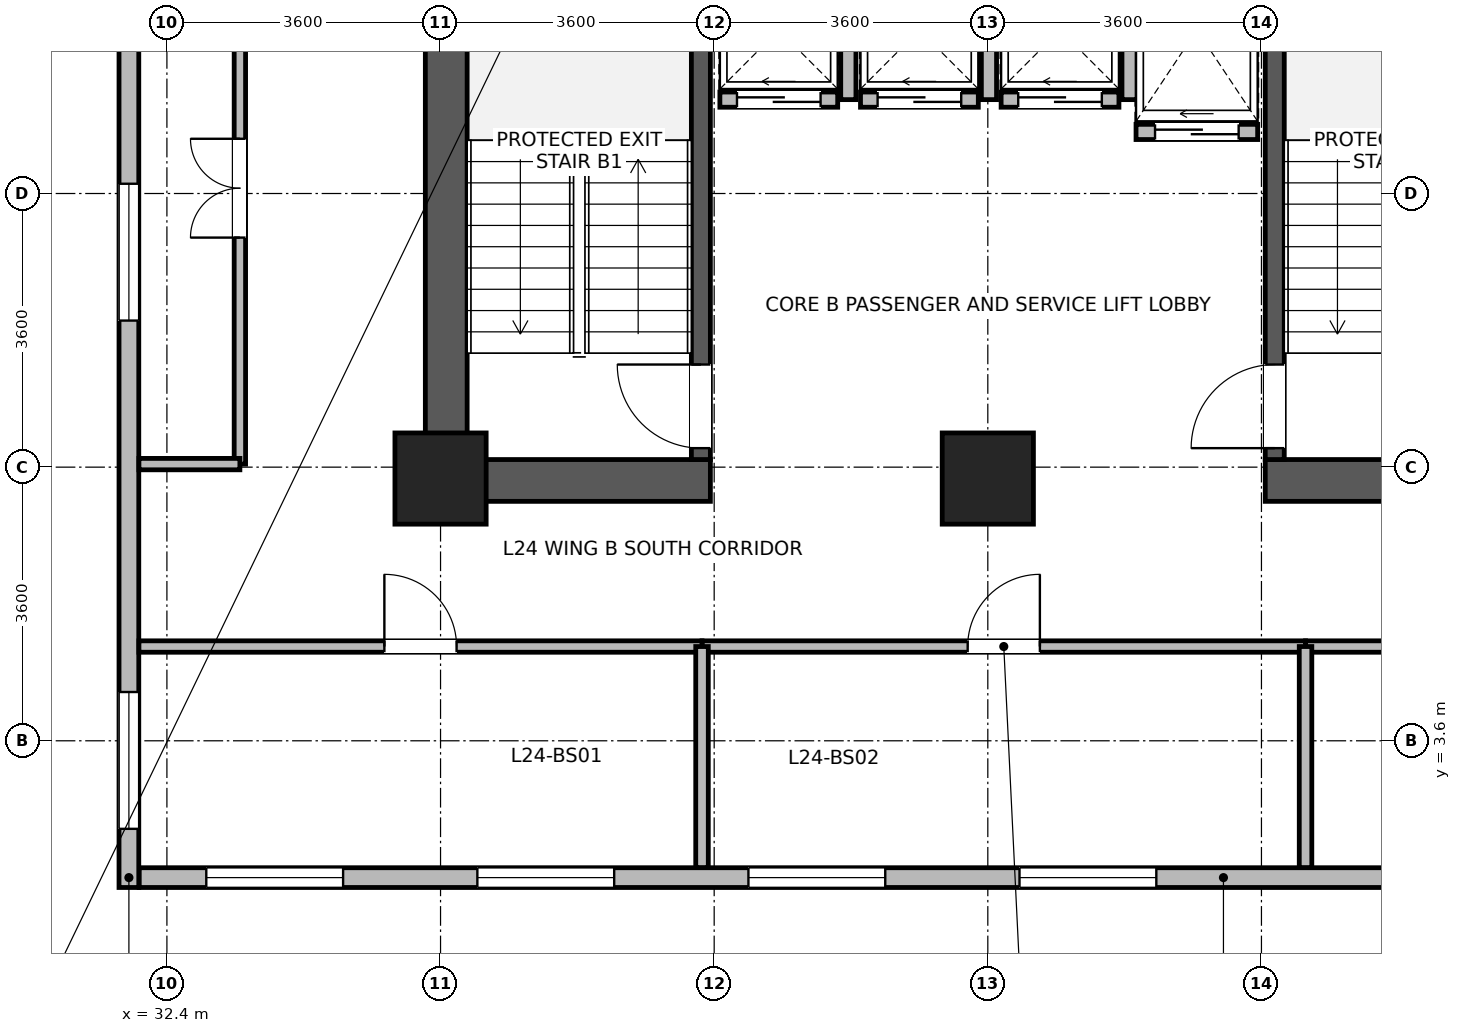
"""IFC4 building model, lengths in metres.
Left out: names, types, materials, properties, quantities, classifications, styles, units other than length and angle.
Written with IfcOpenShell. Run it as: python <this file> out.ifc"""

import sys

from ifc_helpers import new_model, si_unit, direction, frame, frame_2d, origin, origin_2d, place, context, subcontext, project, spatial, rectangle, extrude, source, transform, mapped, element, fill, save


model = new_model("IFC4")
c1 = context("Model", 3, precision=1e-05, world=origin(), true_north=direction((0.0, 1.0)))
c2 = subcontext(c1, "Body", "Model", "MODEL_VIEW")
j1 = project(units=[si_unit("LENGTHUNIT", "METRE"), si_unit("PLANEANGLEUNIT", "RADIAN")], contexts=[c1])
p1 = place(None, origin())
s1 = spatial("IfcSite", under=j1, at=p1, CompositionType="ELEMENT")
p2 = place(p1, origin())
s2 = spatial("IfcBuilding", under=s1, at=p2, CompositionType="ELEMENT")
p3 = place(p2, frame((0.0, 0.0, 97.1)))
s3 = spatial("IfcBuildingStorey", under=s2, at=p3, CompositionType="ELEMENT", Elevation=97.1)
p4 = place(p3, frame((36.075, 6.75, 0.0), z_axis=(0.0, 0.0, 1.0), x_axis=(0.0, 1.0, 0.0)))
e1 = element("IfcWall", 1, at=p4, inside=s3, PredefinedType="SHEAR", context=c2, shape_type="SweptSolid", body=[
    extrude(rectangle(XDim=8.1, YDim=0.55, at=frame_2d((4.05, 0.0))), origin(), (0.0, 0.0, 1.0), 3.45),
])
for number, where, z_axis, x_axis in (
    (2, (36.35, 7.025, 0.0), (0.0, 0.0, 1.0), (1.0, 0.0, 0.0)),
    (3, (46.85, 7.025, 0.0), (0.0, 0.0, 1.0), (1.0, 0.0, 0.0)),
):
    element("IfcWall", number, at=place(p3, frame(where, z_axis=z_axis, x_axis=x_axis)), inside=s3, PredefinedType="SHEAR", context=c2, shape_type="SweptSolid", body=[
        extrude(rectangle(XDim=3.2, YDim=0.55, at=frame_2d((1.6, 0.0))), origin(), (0.0, 0.0, 1.0), 3.45),
    ])
p5 = place(p3, frame((39.425, 7.3, 0.0), z_axis=(0.0, 0.0, 1.0), x_axis=(0.0, 1.0, 0.0)))
e4 = element("IfcWall", 4, at=p5, inside=s3, PredefinedType="SHEAR", context=c2, shape_type="SweptSolid", body=[
    extrude(rectangle(XDim=7.0, YDim=0.25, at=frame_2d((3.5, 0.0))), origin(), (0.0, 0.0, 1.0), 3.45),
])
p6 = place(p5, frame((0.15, 0.0, 0.0)))
e5 = element("IfcOpeningElement", 5, at=p6, cuts=e4, PredefinedType="OPENING", context=c2, shape_type="SweptSolid", body=[
    extrude(rectangle(XDim=1.1, YDim=2.08, at=frame_2d((0.55, 1.04))), frame((0.0, 0.135, 0.0), z_axis=(0.0, -1.0, 0.0), x_axis=(1.0, 0.0, 0.0)), (0.0, 0.0, 1.0), 0.27),
])
p7 = place(p3, frame((46.975, 7.3, 0.0), z_axis=(0.0, 0.0, 1.0), x_axis=(0.0, 1.0, 0.0)))
e6 = element("IfcWall", 6, at=p7, inside=s3, PredefinedType="SHEAR", context=c2, shape_type="SweptSolid", body=[
    extrude(rectangle(XDim=7.0, YDim=0.25, at=frame_2d((3.5, 0.0))), origin(), (0.0, 0.0, 1.0), 3.45),
])
p8 = place(p7, frame((0.15, 0.0, 0.0)))
e7 = element("IfcOpeningElement", 7, at=p8, cuts=e6, PredefinedType="OPENING", context=c2, shape_type="SweptSolid", body=[
    extrude(rectangle(XDim=1.1, YDim=2.08, at=frame_2d((0.55, 1.04))), frame((0.0, 0.135, 0.0), z_axis=(0.0, -1.0, 0.0), x_axis=(1.0, 0.0, 0.0)), (0.0, 0.0, 1.0), 0.27),
])
m1 = source(origin(), c2, "Body", "SweptSolid", [
    extrude(rectangle(XDim=1.2, YDim=1.2, at=origin_2d()), origin(), (0.0, 0.0, 1.0), 3.7),
])
for number, where, z_axis, x_axis in (
    (8, (36.0, 7.05, 0.0), (0.0, 0.0, 1.0), (1.0, 0.0, 0.0)),
    (9, (43.2, 7.05, 0.0), (0.0, 0.0, 1.0), (1.0, 0.0, 0.0)),
):
    element("IfcColumn", number, at=place(p3, frame(where, z_axis=z_axis, x_axis=x_axis)), inside=s3, PredefinedType="COLUMN", context=c2, shape_type="MappedRepresentation", body=[
        mapped(m1, transform((0.0, 0.0, 0.0), x_axis=(1.0, 0.0, 0.0), y_axis=(0.0, 1.0, 0.0), z_axis=(0.0, 0.0, 1.0), scale=1.0)),
    ])
p9 = place(p3, frame((60.565, 1.8, 0.0), z_axis=(0.0, 0.0, 1.0), x_axis=(-1.0, 0.0, 0.0)))
e10 = element("IfcWall", 10, at=p9, inside=s3, PredefinedType="STANDARD", context=c2, shape_type="SweptSolid", body=[
    extrude(rectangle(XDim=28.53, YDim=0.26, at=frame_2d((14.265, 0.0))), origin(), (0.0, 0.0, 1.0), 3.43),
])
p10 = place(p9, frame((0.883, 0.0, 0.85)))
e11 = element("IfcOpeningElement", 11, at=p10, cuts=e10, PredefinedType="OPENING", context=c2, shape_type="SweptSolid", body=[
    extrude(rectangle(XDim=1.8, YDim=1.85, at=frame_2d((0.9, 0.925))), frame((0.0, 0.14, 0.0), z_axis=(0.0, -1.0, 0.0), x_axis=(1.0, 0.0, 0.0)), (0.0, 0.0, 1.0), 0.28),
])
p11 = place(p9, frame((4.449, 0.0, 0.85)))
e12 = element("IfcOpeningElement", 12, at=p11, cuts=e10, PredefinedType="OPENING", context=c2, shape_type="SweptSolid", body=[
    extrude(rectangle(XDim=1.8, YDim=1.85, at=frame_2d((0.9, 0.925))), frame((0.0, 0.14, 0.0), z_axis=(0.0, -1.0, 0.0), x_axis=(1.0, 0.0, 0.0)), (0.0, 0.0, 1.0), 0.28),
])
p12 = place(p9, frame((8.016, 0.0, 0.85)))
e13 = element("IfcOpeningElement", 13, at=p12, cuts=e10, PredefinedType="OPENING", context=c2, shape_type="SweptSolid", body=[
    extrude(rectangle(XDim=1.8, YDim=1.85, at=frame_2d((0.9, 0.925))), frame((0.0, 0.14, 0.0), z_axis=(0.0, -1.0, 0.0), x_axis=(1.0, 0.0, 0.0)), (0.0, 0.0, 1.0), 0.28),
])
p13 = place(p9, frame((15.148, 0.0, 0.85)))
e14 = element("IfcOpeningElement", 14, at=p13, cuts=e10, PredefinedType="OPENING", context=c2, shape_type="SweptSolid", body=[
    extrude(rectangle(XDim=1.8, YDim=1.85, at=frame_2d((0.9, 0.925))), frame((0.0, 0.14, 0.0), z_axis=(0.0, -1.0, 0.0), x_axis=(1.0, 0.0, 0.0)), (0.0, 0.0, 1.0), 0.28),
])
p14 = place(p9, frame((18.714, 0.0, 0.85)))
e15 = element("IfcOpeningElement", 15, at=p14, cuts=e10, PredefinedType="OPENING", context=c2, shape_type="SweptSolid", body=[
    extrude(rectangle(XDim=1.8, YDim=1.85, at=frame_2d((0.9, 0.925))), frame((0.0, 0.14, 0.0), z_axis=(0.0, -1.0, 0.0), x_axis=(1.0, 0.0, 0.0)), (0.0, 0.0, 1.0), 0.28),
])
p15 = place(p9, frame((22.281, 0.0, 0.85)))
e16 = element("IfcOpeningElement", 16, at=p15, cuts=e10, PredefinedType="OPENING", context=c2, shape_type="SweptSolid", body=[
    extrude(rectangle(XDim=1.8, YDim=1.85, at=frame_2d((0.9, 0.925))), frame((0.0, 0.14, 0.0), z_axis=(0.0, -1.0, 0.0), x_axis=(1.0, 0.0, 0.0)), (0.0, 0.0, 1.0), 0.28),
])
p16 = place(p9, frame((25.847, 0.0, 0.85)))
e17 = element("IfcOpeningElement", 17, at=p16, cuts=e10, PredefinedType="OPENING", context=c2, shape_type="SweptSolid", body=[
    extrude(rectangle(XDim=1.8, YDim=1.85, at=frame_2d((0.9, 0.925))), frame((0.0, 0.14, 0.0), z_axis=(0.0, -1.0, 0.0), x_axis=(1.0, 0.0, 0.0)), (0.0, 0.0, 1.0), 0.28),
])
p17 = place(p3, frame((31.9, 1.67, 0.0), z_axis=(0.0, 0.0, 1.0), x_axis=(0.0, 1.0, 0.0)))
e18 = element("IfcWall", 18, at=p17, inside=s3, PredefinedType="STANDARD", context=c2, shape_type="SweptSolid", body=[
    extrude(rectangle(XDim=20.06, YDim=0.26, at=frame_2d((10.03, 0.0))), origin(), (0.0, 0.0, 1.0), 3.43),
])
p18 = place(p17, frame((0.772, 0.0, 0.85)))
e19 = element("IfcOpeningElement", 19, at=p18, cuts=e18, PredefinedType="OPENING", context=c2, shape_type="SweptSolid", body=[
    extrude(rectangle(XDim=1.8, YDim=1.85, at=frame_2d((0.9, 0.925))), frame((0.0, 0.14, 0.0), z_axis=(0.0, -1.0, 0.0), x_axis=(1.0, 0.0, 0.0)), (0.0, 0.0, 1.0), 0.28),
])
p19 = place(p17, frame((7.458, 0.0, 0.85)))
e20 = element("IfcOpeningElement", 20, at=p19, cuts=e18, PredefinedType="OPENING", context=c2, shape_type="SweptSolid", body=[
    extrude(rectangle(XDim=1.8, YDim=1.85, at=frame_2d((0.9, 0.925))), frame((0.0, 0.14, 0.0), z_axis=(0.0, -1.0, 0.0), x_axis=(1.0, 0.0, 0.0)), (0.0, 0.0, 1.0), 0.28),
])
p20 = place(p17, frame((14.145, 0.0, 0.85)))
e21 = element("IfcOpeningElement", 21, at=p20, cuts=e18, PredefinedType="OPENING", context=c2, shape_type="SweptSolid", body=[
    extrude(rectangle(XDim=1.8, YDim=1.85, at=frame_2d((0.9, 0.925))), frame((0.0, 0.14, 0.0), z_axis=(0.0, -1.0, 0.0), x_axis=(1.0, 0.0, 0.0)), (0.0, 0.0, 1.0), 0.28),
])
p21 = place(p17, frame((17.488, 0.0, 0.85)))
e22 = element("IfcOpeningElement", 22, at=p21, cuts=e18, PredefinedType="OPENING", context=c2, shape_type="SweptSolid", body=[
    extrude(rectangle(XDim=1.8, YDim=1.85, at=frame_2d((0.9, 0.925))), frame((0.0, 0.14, 0.0), z_axis=(0.0, -1.0, 0.0), x_axis=(1.0, 0.0, 0.0)), (0.0, 0.0, 1.0), 0.28),
])
p22 = place(p3, frame((39.675, 12.035, 0.0), z_axis=(0.0, 0.0, 1.0), x_axis=(1.0, 0.0, 0.0)))
e23 = element("IfcWall", 23, at=p22, inside=s3, PredefinedType="PARTITIONING", context=c2, shape_type="SweptSolid", body=[
    extrude(rectangle(XDim=1.55, YDim=0.2, at=frame_2d((0.775, 0.0))), origin(), (0.0, 0.0, 1.0), 3.43),
])
p23 = place(p22, frame((0.225, 0.0, 0.0)))
e24 = element("IfcOpeningElement", 24, at=p23, cuts=e23, PredefinedType="OPENING", context=c2, shape_type="SweptSolid", body=[
    extrude(rectangle(XDim=1.1, YDim=2.12, at=frame_2d((0.55, 1.06))), frame((0.0, 0.11, 0.0), z_axis=(0.0, -1.0, 0.0), x_axis=(1.0, 0.0, 0.0)), (0.0, 0.0, 1.0), 0.22),
])
p24 = place(p3, frame((41.365, 12.035, 0.0), z_axis=(0.0, 0.0, 1.0), x_axis=(0.0, 1.0, 0.0)))
e25 = element("IfcWall", 25, at=p24, inside=s3, PredefinedType="PARTITIONING", context=c2, shape_type="SweptSolid", body=[
    extrude(rectangle(XDim=1.83, YDim=0.2, at=frame_2d((0.915, 0.0))), origin(), (0.0, 0.0, 1.0), 3.43),
])
p25 = place(p3, frame((41.525, 12.035, 0.0), z_axis=(0.0, 0.0, 1.0), x_axis=(1.0, 0.0, 0.0)))
e26 = element("IfcWall", 26, at=p25, inside=s3, PredefinedType="PARTITIONING", context=c2, shape_type="SweptSolid", body=[
    extrude(rectangle(XDim=1.55, YDim=0.2, at=frame_2d((0.775, 0.0))), origin(), (0.0, 0.0, 1.0), 3.43),
])
p26 = place(p25, frame((0.225, 0.0, 0.0)))
e27 = element("IfcOpeningElement", 27, at=p26, cuts=e26, PredefinedType="OPENING", context=c2, shape_type="SweptSolid", body=[
    extrude(rectangle(XDim=1.1, YDim=2.12, at=frame_2d((0.55, 1.06))), frame((0.0, 0.11, 0.0), z_axis=(0.0, -1.0, 0.0), x_axis=(1.0, 0.0, 0.0)), (0.0, 0.0, 1.0), 0.22),
])
p27 = place(p3, frame((43.215, 12.035, 0.0), z_axis=(0.0, 0.0, 1.0), x_axis=(0.0, 1.0, 0.0)))
e28 = element("IfcWall", 28, at=p27, inside=s3, PredefinedType="PARTITIONING", context=c2, shape_type="SweptSolid", body=[
    extrude(rectangle(XDim=1.83, YDim=0.2, at=frame_2d((0.915, 0.0))), origin(), (0.0, 0.0, 1.0), 3.43),
])
p28 = place(p3, frame((43.375, 12.035, 0.0), z_axis=(0.0, 0.0, 1.0), x_axis=(1.0, 0.0, 0.0)))
e29 = element("IfcWall", 29, at=p28, inside=s3, PredefinedType="PARTITIONING", context=c2, shape_type="SweptSolid", body=[
    extrude(rectangle(XDim=1.55, YDim=0.2, at=frame_2d((0.775, 0.0))), origin(), (0.0, 0.0, 1.0), 3.43),
])
p29 = place(p28, frame((0.225, 0.0, 0.0)))
e30 = element("IfcOpeningElement", 30, at=p29, cuts=e29, PredefinedType="OPENING", context=c2, shape_type="SweptSolid", body=[
    extrude(rectangle(XDim=1.1, YDim=2.12, at=frame_2d((0.55, 1.06))), frame((0.0, 0.11, 0.0), z_axis=(0.0, -1.0, 0.0), x_axis=(1.0, 0.0, 0.0)), (0.0, 0.0, 1.0), 0.22),
])
p30 = place(p3, frame((45.065, 12.035, 0.0), z_axis=(0.0, 0.0, 1.0), x_axis=(0.0, 1.0, 0.0)))
e31 = element("IfcWall", 31, at=p30, inside=s3, PredefinedType="PARTITIONING", context=c2, shape_type="SweptSolid", body=[
    extrude(rectangle(XDim=1.83, YDim=0.2, at=frame_2d((0.915, 0.0))), origin(), (0.0, 0.0, 1.0), 3.43),
])
p31 = place(p3, frame((45.15, 11.61, 0.0), z_axis=(0.0, 0.0, 1.0), x_axis=(1.0, 0.0, 0.0)))
e32 = element("IfcWall", 32, at=p31, inside=s3, PredefinedType="PARTITIONING", context=c2, shape_type="SweptSolid", body=[
    extrude(rectangle(XDim=1.6, YDim=0.2, at=frame_2d((0.8, 0.0))), origin(), (0.0, 0.0, 1.0), 3.43),
])
p32 = place(p31, frame((0.25, 0.0, 0.0)))
e33 = element("IfcOpeningElement", 33, at=p32, cuts=e32, PredefinedType="OPENING", context=c2, shape_type="SweptSolid", body=[
    extrude(rectangle(XDim=1.1, YDim=2.12, at=frame_2d((0.55, 1.06))), frame((0.0, 0.11, 0.0), z_axis=(0.0, -1.0, 0.0), x_axis=(1.0, 0.0, 0.0)), (0.0, 0.0, 1.0), 0.22),
])
p33 = place(p3, frame((47.38, 4.84, 0.0), z_axis=(0.0, 0.0, 1.0), x_axis=(1.0, 0.0, 0.0)))
e34 = element("IfcWall", 34, at=p33, inside=s3, PredefinedType="PARTITIONING", context=c2, shape_type="SweptSolid", body=[
    extrude(rectangle(XDim=13.188, YDim=0.15, at=frame_2d((6.594, 0.0))), origin(), (0.0, 0.0, 1.0), 3.43),
])
p34 = place(p33, frame((5.944, 0.0, 0.0)))
e35 = element("IfcOpeningElement", 35, at=p34, cuts=e34, PredefinedType="OPENING", context=c2, shape_type="SweptSolid", body=[
    extrude(rectangle(XDim=1.3, YDim=2.12, at=frame_2d((0.65, 1.06))), frame((0.0, 0.085, 0.0), z_axis=(0.0, -1.0, 0.0), x_axis=(1.0, 0.0, 0.0)), (0.0, 0.0, 1.0), 0.17),
])
p35 = place(p3, frame((39.44, 4.84, 0.0), z_axis=(0.0, 0.0, 1.0), x_axis=(1.0, 0.0, 0.0)))
e36 = element("IfcWall", 36, at=p35, inside=s3, PredefinedType="PARTITIONING", context=c2, shape_type="SweptSolid", body=[
    extrude(rectangle(XDim=7.94, YDim=0.15, at=frame_2d((3.97, 0.0))), origin(), (0.0, 0.0, 1.0), 3.43),
])
p36 = place(p35, frame((3.495, 0.0, 0.0)))
e37 = element("IfcOpeningElement", 37, at=p36, cuts=e36, PredefinedType="OPENING", context=c2, shape_type="SweptSolid", body=[
    extrude(rectangle(XDim=0.95, YDim=2.1, at=frame_2d((0.475, 1.05))), frame((0.0, 0.085, 0.0), z_axis=(0.0, -1.0, 0.0), x_axis=(1.0, 0.0, 0.0)), (0.0, 0.0, 1.0), 0.17),
])
p37 = place(p3, frame((32.032, 4.84, 0.0), z_axis=(0.0, 0.0, 1.0), x_axis=(1.0, 0.0, 0.0)))
e38 = element("IfcWall", 38, at=p37, inside=s3, PredefinedType="PARTITIONING", context=c2, shape_type="SweptSolid", body=[
    extrude(rectangle(XDim=7.408, YDim=0.15, at=frame_2d((3.704, 0.0))), origin(), (0.0, 0.0, 1.0), 3.43),
])
p38 = place(p37, frame((3.229, 0.0, 0.0)))
e39 = element("IfcOpeningElement", 39, at=p38, cuts=e38, PredefinedType="OPENING", context=c2, shape_type="SweptSolid", body=[
    extrude(rectangle(XDim=0.95, YDim=2.1, at=frame_2d((0.475, 1.05))), frame((0.0, 0.085, 0.0), z_axis=(0.0, -1.0, 0.0), x_axis=(1.0, 0.0, 0.0)), (0.0, 0.0, 1.0), 0.17),
])
p39 = place(p3, frame((33.36, 7.24, 0.0), z_axis=(0.0, 0.0, 1.0), x_axis=(0.0, 1.0, 0.0)))
e40 = element("IfcWall", 40, at=p39, inside=s3, PredefinedType="PARTITIONING", context=c2, shape_type="SweptSolid", body=[
    extrude(rectangle(XDim=7.26, YDim=0.15, at=frame_2d((3.63, 0.0))), origin(), (0.0, 0.0, 1.0), 3.43),
])
p40 = place(p39, frame((2.98, 0.0, 0.0)))
e41 = element("IfcOpeningElement", 41, at=p40, cuts=e40, PredefinedType="OPENING", context=c2, shape_type="SweptSolid", body=[
    extrude(rectangle(XDim=1.3, YDim=2.12, at=frame_2d((0.65, 1.06))), frame((0.0, 0.085, 0.0), z_axis=(0.0, -1.0, 0.0), x_axis=(1.0, 0.0, 0.0)), (0.0, 0.0, 1.0), 0.17),
])
p41 = place(p3, frame((32.032, 7.24, 0.0), z_axis=(0.0, 0.0, 1.0), x_axis=(1.0, 0.0, 0.0)))
e42 = element("IfcWall", 42, at=p41, inside=s3, PredefinedType="PARTITIONING", context=c2, shape_type="SweptSolid", body=[
    extrude(rectangle(XDim=1.328, YDim=0.15, at=frame_2d((0.664, 0.0))), origin(), (0.0, 0.0, 1.0), 3.43),
])
for number, where, z_axis, x_axis in (
    (43, (39.44, 1.932, 0.0), (0.0, 0.0, 1.0), (0.0, 1.0, 0.0)),
    (44, (47.38, 1.932, 0.0), (0.0, 0.0, 1.0), (0.0, 1.0, 0.0)),
):
    element("IfcWall", number, at=place(p3, frame(where, z_axis=z_axis, x_axis=x_axis)), inside=s3, PredefinedType="PARTITIONING", context=c2, shape_type="SweptSolid", body=[
        extrude(rectangle(XDim=2.908, YDim=0.165, at=frame_2d((1.454, 0.0))), origin(), (0.0, 0.0, 1.0), 3.43),
    ])
p42 = place(p13, origin())
e45 = element("IfcWindow", 45, at=p42, inside=s3, PartitioningType="SINGLE_PANEL", PredefinedType="WINDOW", context=c2, shape_type="SweptSolid", body=[
    extrude(rectangle(XDim=1.8, YDim=1.85, at=frame_2d((0.9, 0.925))), frame((0.0, 0.03, 0.0), z_axis=(0.0, -1.0, 0.0), x_axis=(1.0, 0.0, 0.0)), (0.0, 0.0, 1.0), 0.06),
])
fill(e14, e45)
p43 = place(p14, origin())
e46 = element("IfcWindow", 46, at=p43, inside=s3, PartitioningType="SINGLE_PANEL", PredefinedType="WINDOW", context=c2, shape_type="SweptSolid", body=[
    extrude(rectangle(XDim=1.8, YDim=1.85, at=frame_2d((0.9, 0.925))), frame((0.0, 0.03, 0.0), z_axis=(0.0, -1.0, 0.0), x_axis=(1.0, 0.0, 0.0)), (0.0, 0.0, 1.0), 0.06),
])
fill(e15, e46)
p44 = place(p15, origin())
e47 = element("IfcWindow", 47, at=p44, inside=s3, PartitioningType="SINGLE_PANEL", PredefinedType="WINDOW", context=c2, shape_type="SweptSolid", body=[
    extrude(rectangle(XDim=1.8, YDim=1.85, at=frame_2d((0.9, 0.925))), frame((0.0, 0.03, 0.0), z_axis=(0.0, -1.0, 0.0), x_axis=(1.0, 0.0, 0.0)), (0.0, 0.0, 1.0), 0.06),
])
fill(e16, e47)
p45 = place(p16, origin())
e48 = element("IfcWindow", 48, at=p45, inside=s3, PartitioningType="SINGLE_PANEL", PredefinedType="WINDOW", context=c2, shape_type="SweptSolid", body=[
    extrude(rectangle(XDim=1.8, YDim=1.85, at=frame_2d((0.9, 0.925))), frame((0.0, 0.03, 0.0), z_axis=(0.0, -1.0, 0.0), x_axis=(1.0, 0.0, 0.0)), (0.0, 0.0, 1.0), 0.06),
])
fill(e17, e48)
p46 = place(p18, origin())
e49 = element("IfcWindow", 49, at=p46, inside=s3, PartitioningType="SINGLE_PANEL", PredefinedType="WINDOW", context=c2, shape_type="SweptSolid", body=[
    extrude(rectangle(XDim=1.8, YDim=1.85, at=frame_2d((0.9, 0.925))), frame((0.0, 0.03, 0.0), z_axis=(0.0, -1.0, 0.0), x_axis=(1.0, 0.0, 0.0)), (0.0, 0.0, 1.0), 0.06),
])
fill(e19, e49)
p47 = place(p19, origin())
e50 = element("IfcWindow", 50, at=p47, inside=s3, PartitioningType="SINGLE_PANEL", PredefinedType="WINDOW", context=c2, shape_type="SweptSolid", body=[
    extrude(rectangle(XDim=1.8, YDim=1.85, at=frame_2d((0.9, 0.925))), frame((0.0, 0.03, 0.0), z_axis=(0.0, -1.0, 0.0), x_axis=(1.0, 0.0, 0.0)), (0.0, 0.0, 1.0), 0.06),
])
fill(e20, e50)
p48 = place(p6, origin())
e51 = element("IfcDoor", 51, at=p48, inside=s3, OperationType="SINGLE_SWING_RIGHT", PredefinedType="DOOR", context=c2, shape_type="SweptSolid", body=[
    extrude(rectangle(XDim=1.1, YDim=2.08, at=frame_2d((0.55, 1.04))), frame((0.0, 0.025, 0.0), z_axis=(0.0, -1.0, 0.0), x_axis=(1.0, 0.0, 0.0)), (0.0, 0.0, 1.0), 0.05),
])
fill(e5, e51)
p49 = place(p8, origin())
e52 = element("IfcDoor", 52, at=p49, inside=s3, OperationType="SINGLE_SWING_LEFT", PredefinedType="DOOR", context=c2, shape_type="SweptSolid", body=[
    extrude(rectangle(XDim=1.1, YDim=2.08, at=frame_2d((0.55, 1.04))), frame((0.0, 0.025, 0.0), z_axis=(0.0, -1.0, 0.0), x_axis=(1.0, 0.0, 0.0)), (0.0, 0.0, 1.0), 0.05),
])
fill(e7, e52)
p50 = place(p23, origin())
e53 = element("IfcDoor", 53, at=p50, inside=s3, OperationType="SLIDING_TO_LEFT", PredefinedType="DOOR", context=c2, shape_type="SweptSolid", body=[
    extrude(rectangle(XDim=1.1, YDim=2.12, at=frame_2d((0.55, 1.06))), frame((0.0, 0.025, 0.0), z_axis=(0.0, -1.0, 0.0), x_axis=(1.0, 0.0, 0.0)), (0.0, 0.0, 1.0), 0.05),
])
fill(e24, e53)
p51 = place(p26, origin())
e54 = element("IfcDoor", 54, at=p51, inside=s3, OperationType="SLIDING_TO_LEFT", PredefinedType="DOOR", context=c2, shape_type="SweptSolid", body=[
    extrude(rectangle(XDim=1.1, YDim=2.12, at=frame_2d((0.55, 1.06))), frame((0.0, 0.025, 0.0), z_axis=(0.0, -1.0, 0.0), x_axis=(1.0, 0.0, 0.0)), (0.0, 0.0, 1.0), 0.05),
])
fill(e27, e54)
p52 = place(p29, origin())
e55 = element("IfcDoor", 55, at=p52, inside=s3, OperationType="SLIDING_TO_LEFT", PredefinedType="DOOR", context=c2, shape_type="SweptSolid", body=[
    extrude(rectangle(XDim=1.1, YDim=2.12, at=frame_2d((0.55, 1.06))), frame((0.0, 0.025, 0.0), z_axis=(0.0, -1.0, 0.0), x_axis=(1.0, 0.0, 0.0)), (0.0, 0.0, 1.0), 0.05),
])
fill(e30, e55)
p53 = place(p32, origin())
e56 = element("IfcDoor", 56, at=p53, inside=s3, OperationType="SLIDING_TO_LEFT", PredefinedType="DOOR", context=c2, shape_type="SweptSolid", body=[
    extrude(rectangle(XDim=1.1, YDim=2.12, at=frame_2d((0.55, 1.06))), frame((0.0, 0.025, 0.0), z_axis=(0.0, -1.0, 0.0), x_axis=(1.0, 0.0, 0.0)), (0.0, 0.0, 1.0), 0.05),
])
fill(e33, e56)
p54 = place(p36, origin())
e57 = element("IfcDoor", 57, at=p54, inside=s3, OperationType="SINGLE_SWING_RIGHT", PredefinedType="DOOR", context=c2, shape_type="SweptSolid", body=[
    extrude(rectangle(XDim=0.95, YDim=2.1, at=frame_2d((0.475, 1.05))), frame((0.0, 0.025, 0.0), z_axis=(0.0, -1.0, 0.0), x_axis=(1.0, 0.0, 0.0)), (0.0, 0.0, 1.0), 0.05),
])
fill(e37, e57)
p55 = place(p38, origin())
e58 = element("IfcDoor", 58, at=p55, inside=s3, OperationType="SINGLE_SWING_LEFT", PredefinedType="DOOR", context=c2, shape_type="SweptSolid", body=[
    extrude(rectangle(XDim=0.95, YDim=2.1, at=frame_2d((0.475, 1.05))), frame((0.0, 0.025, 0.0), z_axis=(0.0, -1.0, 0.0), x_axis=(1.0, 0.0, 0.0)), (0.0, 0.0, 1.0), 0.05),
])
fill(e39, e58)
p56 = place(p40, origin())
e59 = element("IfcDoor", 59, at=p56, inside=s3, OperationType="DOUBLE_DOOR_SINGLE_SWING", PredefinedType="DOOR", context=c2, shape_type="SweptSolid", body=[
    extrude(rectangle(XDim=1.3, YDim=2.12, at=frame_2d((0.65, 1.06))), frame((0.0, 0.025, 0.0), z_axis=(0.0, -1.0, 0.0), x_axis=(1.0, 0.0, 0.0)), (0.0, 0.0, 1.0), 0.05),
])
fill(e41, e59)
save(model, sys.argv[1])
